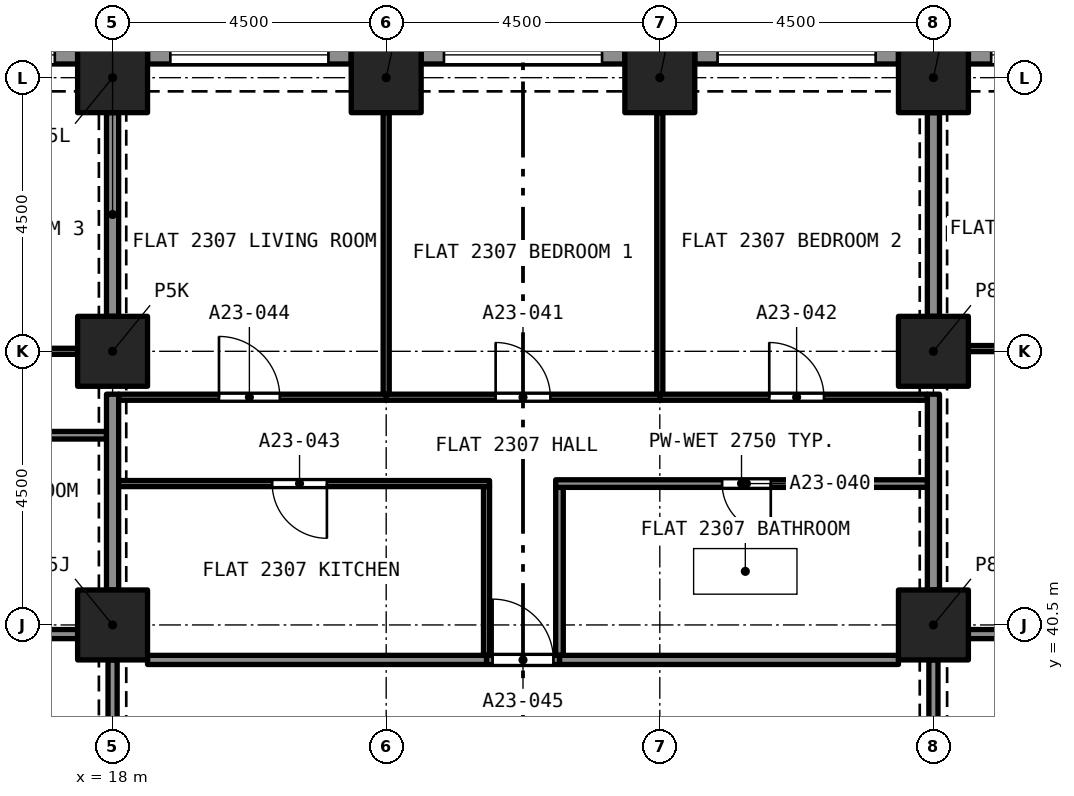
"""IFC4 building model, lengths in metres.
Left out: names, types, materials, properties, quantities, classifications, styles, units other than length and angle.
Written with IfcOpenShell. Run it as: python <this file> out.ifc"""

import sys

from ifc_helpers import new_model, si_unit, direction, frame, frame_2d, origin, origin_2d, place, context, subcontext, project, spatial, rectangle, extrude, element, fill, save


model = new_model("IFC4")
c1 = context("Model", 3, precision=1e-05, world=origin(), true_north=direction((0.0, 1.0)))
c2 = subcontext(c1, "Body", "Model", "MODEL_VIEW")
j1 = project(units=[si_unit("LENGTHUNIT", "METRE"), si_unit("PLANEANGLEUNIT", "RADIAN")], contexts=[c1])
p1 = place(None, origin())
s1 = spatial("IfcSite", under=j1, at=p1, CompositionType="ELEMENT")
p2 = place(p1, origin())
s2 = spatial("IfcBuilding", under=s1, at=p2, CompositionType="ELEMENT")
p3 = place(p2, frame((0.0, 0.0, 86.4)))
s3 = spatial("IfcBuildingStorey", under=s2, at=p3, CompositionType="ELEMENT", Elevation=86.4)
for number, where, z_axis, x_axis in (
    (1, (18.0, 40.5, 0.0), (0.0, 0.0, 1.0), (1.0, 0.0, 0.0)),
    (2, (31.5, 40.5, 0.0), (0.0, 0.0, 1.0), (1.0, 0.0, 0.0)),
    (3, (18.0, 45.0, 0.0), (0.0, 0.0, 1.0), (1.0, 0.0, 0.0)),
    (4, (31.5, 45.0, 0.0), (0.0, 0.0, 1.0), (1.0, 0.0, 0.0)),
    (5, (18.0, 49.5, 0.0), (0.0, 0.0, 1.0), (1.0, 0.0, 0.0)),
    (6, (22.5, 49.5, 0.0), (0.0, 0.0, 1.0), (1.0, 0.0, 0.0)),
    (7, (27.0, 49.5, 0.0), (0.0, 0.0, 1.0), (1.0, 0.0, 0.0)),
    (8, (31.5, 49.5, 0.0), (0.0, 0.0, 1.0), (1.0, 0.0, 0.0)),
):
    element("IfcColumn", number, at=place(p3, frame(where, z_axis=z_axis, x_axis=x_axis)), inside=s3, PredefinedType="COLUMN", context=c2, shape_type="SweptSolid", body=[
        extrude(rectangle(XDim=1.15, YDim=1.15, at=origin_2d()), origin(), (0.0, 0.0, 1.0), 3.2),
    ])
p4 = place(p3, frame((32.075, 49.875, 0.0), z_axis=(0.0, 0.0, 1.0), x_axis=(1.0, 0.0, 0.0)))
e9 = element("IfcWall", 9, at=p4, inside=s3, PredefinedType="SOLIDWALL", context=c2, shape_type="SweptSolid", body=[
    extrude(rectangle(XDim=3.35, YDim=0.3, at=frame_2d((1.675, 0.0))), origin(), (0.0, 0.0, 1.0), 3.2),
])
p5 = place(p4, frame((0.375, 0.0, 0.45)))
e10 = element("IfcOpeningElement", 10, at=p5, cuts=e9, PredefinedType="OPENING", context=c2, shape_type="SweptSolid", body=[
    extrude(rectangle(XDim=2.6, YDim=1.95, at=frame_2d((1.3, 0.975))), frame((0.0, 0.16, 0.0), z_axis=(0.0, -1.0, 0.0), x_axis=(1.0, 0.0, 0.0)), (0.0, 0.0, 1.0), 0.32),
])
p6 = place(p3, frame((27.575, 49.875, 0.0), z_axis=(0.0, 0.0, 1.0), x_axis=(1.0, 0.0, 0.0)))
e11 = element("IfcWall", 11, at=p6, inside=s3, PredefinedType="SOLIDWALL", context=c2, shape_type="SweptSolid", body=[
    extrude(rectangle(XDim=3.35, YDim=0.3, at=frame_2d((1.675, 0.0))), origin(), (0.0, 0.0, 1.0), 3.2),
])
p7 = place(p6, frame((0.375, 0.0, 0.45)))
e12 = element("IfcOpeningElement", 12, at=p7, cuts=e11, PredefinedType="OPENING", context=c2, shape_type="SweptSolid", body=[
    extrude(rectangle(XDim=2.6, YDim=1.95, at=frame_2d((1.3, 0.975))), frame((0.0, 0.16, 0.0), z_axis=(0.0, -1.0, 0.0), x_axis=(1.0, 0.0, 0.0)), (0.0, 0.0, 1.0), 0.32),
])
p8 = place(p3, frame((23.075, 49.875, 0.0), z_axis=(0.0, 0.0, 1.0), x_axis=(1.0, 0.0, 0.0)))
e13 = element("IfcWall", 13, at=p8, inside=s3, PredefinedType="SOLIDWALL", context=c2, shape_type="SweptSolid", body=[
    extrude(rectangle(XDim=3.35, YDim=0.3, at=frame_2d((1.675, 0.0))), origin(), (0.0, 0.0, 1.0), 3.2),
])
p9 = place(p8, frame((0.375, 0.0, 0.45)))
e14 = element("IfcOpeningElement", 14, at=p9, cuts=e13, PredefinedType="OPENING", context=c2, shape_type="SweptSolid", body=[
    extrude(rectangle(XDim=2.6, YDim=1.95, at=frame_2d((1.3, 0.975))), frame((0.0, 0.16, 0.0), z_axis=(0.0, -1.0, 0.0), x_axis=(1.0, 0.0, 0.0)), (0.0, 0.0, 1.0), 0.32),
])
p10 = place(p3, frame((18.575, 49.875, 0.0), z_axis=(0.0, 0.0, 1.0), x_axis=(1.0, 0.0, 0.0)))
e15 = element("IfcWall", 15, at=p10, inside=s3, PredefinedType="SOLIDWALL", context=c2, shape_type="SweptSolid", body=[
    extrude(rectangle(XDim=3.35, YDim=0.3, at=frame_2d((1.675, 0.0))), origin(), (0.0, 0.0, 1.0), 3.2),
])
p11 = place(p10, frame((0.375, 0.0, 0.45)))
e16 = element("IfcOpeningElement", 16, at=p11, cuts=e15, PredefinedType="OPENING", context=c2, shape_type="SweptSolid", body=[
    extrude(rectangle(XDim=2.6, YDim=1.95, at=frame_2d((1.3, 0.975))), frame((0.0, 0.16, 0.0), z_axis=(0.0, -1.0, 0.0), x_axis=(1.0, 0.0, 0.0)), (0.0, 0.0, 1.0), 0.32),
])
p12 = place(p3, frame((14.075, 49.875, 0.0), z_axis=(0.0, 0.0, 1.0), x_axis=(1.0, 0.0, 0.0)))
e17 = element("IfcWall", 17, at=p12, inside=s3, PredefinedType="SOLIDWALL", context=c2, shape_type="SweptSolid", body=[
    extrude(rectangle(XDim=3.35, YDim=0.3, at=frame_2d((1.675, 0.0))), origin(), (0.0, 0.0, 1.0), 3.2),
])
p13 = place(p12, frame((0.375, 0.0, 0.45)))
e18 = element("IfcOpeningElement", 18, at=p13, cuts=e17, PredefinedType="OPENING", context=c2, shape_type="SweptSolid", body=[
    extrude(rectangle(XDim=2.6, YDim=1.95, at=frame_2d((1.3, 0.975))), frame((0.0, 0.16, 0.0), z_axis=(0.0, -1.0, 0.0), x_axis=(1.0, 0.0, 0.0)), (0.0, 0.0, 1.0), 0.32),
])
p14 = place(p3, frame((17.9, 43.62, 0.0), z_axis=(0.0, 0.0, 1.0), x_axis=(-1.0, 0.0, 0.0)))
e19 = element("IfcWall", 19, at=p14, inside=s3, PredefinedType="PARTITIONING", context=c2, shape_type="SweptSolid", body=[
    extrude(rectangle(XDim=4.437, YDim=0.125, at=frame_2d((2.219, 0.0))), origin(), (0.0, 0.0, 1.0), 2.9),
])
p15 = place(p14, frame((1.769, 0.0, 0.0)))
e20 = element("IfcOpeningElement", 20, at=p15, cuts=e19, PredefinedType="OPENING", context=c2, shape_type="SweptSolid", body=[
    extrude(rectangle(XDim=0.8, YDim=2.1, at=frame_2d((0.4, 1.05))), frame((0.0, 0.073, 0.0), z_axis=(0.0, -1.0, 0.0), x_axis=(1.0, 0.0, 0.0)), (0.0, 0.0, 1.0), 0.145),
])
p16 = place(p3, frame((18.0, 41.075, 0.0), z_axis=(0.0, 0.0, 1.0), x_axis=(0.0, 1.0, 0.0)))
e21 = element("IfcWall", 21, at=p16, inside=s3, PredefinedType="PARTITIONING", context=c2, shape_type="SweptSolid", body=[
    extrude(rectangle(XDim=3.22, YDim=0.2, at=frame_2d((1.61, 0.0))), origin(), (0.0, 0.0, 1.0), 2.38),
])
p17 = place(p3, frame((13.4, 40.35, 0.0), z_axis=(0.0, 0.0, 1.0), x_axis=(1.0, 0.0, 0.0)))
e22 = element("IfcWall", 22, at=p17, inside=s3, PredefinedType="PARTITIONING", context=c2, shape_type="SweptSolid", body=[
    extrude(rectangle(XDim=4.025, YDim=0.15, at=frame_2d((2.012, 0.0))), origin(), (0.0, 0.0, 1.0), 2.9),
])
p18 = place(p3, frame((13.5, 45.0, 0.0), z_axis=(0.0, 0.0, 1.0), x_axis=(1.0, 0.0, 0.0)))
e23 = element("IfcWall", 23, at=p18, inside=s3, PredefinedType="PARTITIONING", context=c2, shape_type="SweptSolid", body=[
    extrude(rectangle(XDim=3.925, YDim=0.1, at=frame_2d((1.962, 0.0))), origin(), (0.0, 0.0, 1.0), 2.9),
])
p19 = place(p18, frame((1.8, 0.0, 0.0)))
e24 = element("IfcOpeningElement", 24, at=p19, cuts=e23, PredefinedType="OPENING", context=c2, shape_type="SweptSolid", body=[
    extrude(rectangle(XDim=0.9, YDim=2.1, at=frame_2d((0.45, 1.05))), frame((0.0, 0.06, 0.0), z_axis=(0.0, -1.0, 0.0), x_axis=(1.0, 0.0, 0.0)), (0.0, 0.0, 1.0), 0.12),
])
p20 = place(p3, frame((18.0, 45.575, 0.0), z_axis=(0.0, 0.0, 1.0), x_axis=(0.0, 1.0, 0.0)))
e25 = element("IfcWall", 25, at=p20, inside=s3, PredefinedType="PARTITIONING", context=c2, shape_type="SweptSolid", body=[
    extrude(rectangle(XDim=3.35, YDim=0.2, at=frame_2d((1.675, 0.0))), origin(), (0.0, 0.0, 1.0), 2.38),
])
p21 = place(p3, frame((32.075, 45.045, 0.0), z_axis=(0.0, 0.0, 1.0), x_axis=(1.0, 0.0, 0.0)))
e26 = element("IfcWall", 26, at=p21, inside=s3, PredefinedType="PARTITIONING", context=c2, shape_type="SweptSolid", body=[
    extrude(rectangle(XDim=3.925, YDim=0.1, at=frame_2d((1.962, 0.0))), origin(), (0.0, 0.0, 1.0), 2.9),
])
p22 = place(p21, frame((1.175, 0.0, 0.0)))
e27 = element("IfcOpeningElement", 27, at=p22, cuts=e26, PredefinedType="OPENING", context=c2, shape_type="SweptSolid", body=[
    extrude(rectangle(XDim=1.0, YDim=2.1, at=frame_2d((0.5, 1.05))), frame((0.0, 0.06, 0.0), z_axis=(0.0, -1.0, 0.0), x_axis=(1.0, 0.0, 0.0)), (0.0, 0.0, 1.0), 0.12),
])
p23 = place(p3, frame((31.5, 41.075, 0.0), z_axis=(0.0, 0.0, 1.0), x_axis=(0.0, 1.0, 0.0)))
e28 = element("IfcWall", 28, at=p23, inside=s3, PredefinedType="PARTITIONING", context=c2, shape_type="SweptSolid", body=[
    extrude(rectangle(XDim=3.22, YDim=0.2, at=frame_2d((1.61, 0.0))), origin(), (0.0, 0.0, 1.0), 2.38),
])
p24 = place(p3, frame((32.075, 40.35, 0.0), z_axis=(0.0, 0.0, 1.0), x_axis=(1.0, 0.0, 0.0)))
e29 = element("IfcWall", 29, at=p24, inside=s3, PredefinedType="PARTITIONING", context=c2, shape_type="SweptSolid", body=[
    extrude(rectangle(XDim=2.275, YDim=0.15, at=frame_2d((1.138, 0.0))), origin(), (0.0, 0.0, 1.0), 2.9),
])
p25 = place(p24, frame((1.145, 0.0, 0.0)))
e30 = element("IfcOpeningElement", 30, at=p25, cuts=e29, PredefinedType="OPENING", context=c2, shape_type="SweptSolid", body=[
    extrude(rectangle(XDim=1.0, YDim=2.1, at=frame_2d((0.5, 1.05))), frame((0.0, 0.085, 0.0), z_axis=(0.0, -1.0, 0.0), x_axis=(1.0, 0.0, 0.0)), (0.0, 0.0, 1.0), 0.17),
])
p26 = place(p3, frame((31.5, 45.575, 0.0), z_axis=(0.0, 0.0, 1.0), x_axis=(0.0, 1.0, 0.0)))
e31 = element("IfcWall", 31, at=p26, inside=s3, PredefinedType="PARTITIONING", context=c2, shape_type="SweptSolid", body=[
    extrude(rectangle(XDim=3.35, YDim=0.2, at=frame_2d((1.675, 0.0))), origin(), (0.0, 0.0, 1.0), 2.38),
])
p27 = place(p3, frame((25.35, 40.0, 0.0), z_axis=(0.0, 0.0, 1.0), x_axis=(0.0, 1.0, 0.0)))
e32 = element("IfcWall", 32, at=p27, inside=s3, PredefinedType="PARTITIONING", context=c2, shape_type="SweptSolid", body=[
    extrude(rectangle(XDim=2.762, YDim=0.125, at=frame_2d((1.381, 0.0))), origin(), (0.0, 0.0, 1.0), 2.75),
])
p28 = place(p3, frame((31.4, 42.825, 0.0), z_axis=(0.0, 0.0, 1.0), x_axis=(-1.0, 0.0, 0.0)))
e33 = element("IfcWall", 33, at=p28, inside=s3, PredefinedType="PARTITIONING", context=c2, shape_type="SweptSolid", body=[
    extrude(rectangle(XDim=6.112, YDim=0.125, at=frame_2d((3.056, 0.0))), origin(), (0.0, 0.0, 1.0), 2.75),
])
p29 = place(p28, frame((2.575, 0.0, 0.0)))
e34 = element("IfcOpeningElement", 34, at=p29, cuts=e33, PredefinedType="OPENING", context=c2, shape_type="SweptSolid", body=[
    extrude(rectangle(XDim=0.8, YDim=2.1, at=frame_2d((0.4, 1.05))), frame((0.0, 0.073, 0.0), z_axis=(0.0, -1.0, 0.0), x_axis=(1.0, 0.0, 0.0)), (0.0, 0.0, 1.0), 0.145),
])
p30 = place(p3, frame((25.35, 39.925, 0.0), z_axis=(0.0, 0.0, 1.0), x_axis=(1.0, 0.0, 0.0)))
e35 = element("IfcWall", 35, at=p30, inside=s3, PredefinedType="PARTITIONING", context=c2, shape_type="SweptSolid", body=[
    extrude(rectangle(XDim=5.575, YDim=0.15, at=frame_2d((2.788, 0.0))), origin(), (0.0, 0.0, 1.0), 2.75),
])
p31 = place(p3, frame((27.0, 44.295, 0.0), z_axis=(0.0, 0.0, 1.0), x_axis=(0.0, 1.0, 0.0)))
e36 = element("IfcWall", 36, at=p31, inside=s3, PredefinedType="PARTITIONING", context=c2, shape_type="SweptSolid", body=[
    extrude(rectangle(XDim=4.63, YDim=0.1, at=frame_2d((2.315, 0.0))), origin(), (0.0, 0.0, 1.0), 2.75),
])
p32 = place(p3, frame((22.5, 44.245, 0.0), z_axis=(0.0, 0.0, 1.0), x_axis=(1.0, 0.0, 0.0)))
e37 = element("IfcWall", 37, at=p32, inside=s3, PredefinedType="PARTITIONING", context=c2, shape_type="SweptSolid", body=[
    extrude(rectangle(XDim=4.5, YDim=0.1, at=frame_2d((2.25, 0.0))), origin(), (0.0, 0.0, 1.0), 2.75),
])
p33 = place(p32, frame((1.8, 0.0, 0.0)))
e38 = element("IfcOpeningElement", 38, at=p33, cuts=e37, PredefinedType="OPENING", context=c2, shape_type="SweptSolid", body=[
    extrude(rectangle(XDim=0.9, YDim=2.1, at=frame_2d((0.45, 1.05))), frame((0.0, 0.06, 0.0), z_axis=(0.0, -1.0, 0.0), x_axis=(1.0, 0.0, 0.0)), (0.0, 0.0, 1.0), 0.12),
])
p34 = place(p3, frame((22.5, 44.295, 0.0), z_axis=(0.0, 0.0, 1.0), x_axis=(0.0, 1.0, 0.0)))
e39 = element("IfcWall", 39, at=p34, inside=s3, PredefinedType="PARTITIONING", context=c2, shape_type="SweptSolid", body=[
    extrude(rectangle(XDim=4.63, YDim=0.1, at=frame_2d((2.315, 0.0))), origin(), (0.0, 0.0, 1.0), 2.75),
])
p35 = place(p3, frame((27.0, 44.245, 0.0), z_axis=(0.0, 0.0, 1.0), x_axis=(1.0, 0.0, 0.0)))
e40 = element("IfcWall", 40, at=p35, inside=s3, PredefinedType="PARTITIONING", context=c2, shape_type="SweptSolid", body=[
    extrude(rectangle(XDim=4.4, YDim=0.1, at=frame_2d((2.2, 0.0))), origin(), (0.0, 0.0, 1.0), 2.75),
])
p36 = place(p35, frame((1.8, 0.0, 0.0)))
e41 = element("IfcOpeningElement", 41, at=p36, cuts=e40, PredefinedType="OPENING", context=c2, shape_type="SweptSolid", body=[
    extrude(rectangle(XDim=0.9, YDim=2.1, at=frame_2d((0.45, 1.05))), frame((0.0, 0.06, 0.0), z_axis=(0.0, -1.0, 0.0), x_axis=(1.0, 0.0, 0.0)), (0.0, 0.0, 1.0), 0.12),
])
p37 = place(p3, frame((24.15, 40.0, 0.0), z_axis=(0.0, 0.0, 1.0), x_axis=(0.0, 1.0, 0.0)))
e42 = element("IfcWall", 42, at=p37, inside=s3, PredefinedType="PARTITIONING", context=c2, shape_type="SweptSolid", body=[
    extrude(rectangle(XDim=2.775, YDim=0.1, at=frame_2d((1.387, 0.0))), origin(), (0.0, 0.0, 1.0), 2.75),
])
p38 = place(p3, frame((24.2, 42.825, 0.0), z_axis=(0.0, 0.0, 1.0), x_axis=(-1.0, 0.0, 0.0)))
e43 = element("IfcWall", 43, at=p38, inside=s3, PredefinedType="PARTITIONING", context=c2, shape_type="SweptSolid", body=[
    extrude(rectangle(XDim=6.1, YDim=0.1, at=frame_2d((3.05, 0.0))), origin(), (0.0, 0.0, 1.0), 2.75),
])
p39 = place(p38, frame((2.675, 0.0, 0.0)))
e44 = element("IfcOpeningElement", 44, at=p39, cuts=e43, PredefinedType="OPENING", context=c2, shape_type="SweptSolid", body=[
    extrude(rectangle(XDim=0.9, YDim=2.1, at=frame_2d((0.45, 1.05))), frame((0.0, 0.06, 0.0), z_axis=(0.0, -1.0, 0.0), x_axis=(1.0, 0.0, 0.0)), (0.0, 0.0, 1.0), 0.12),
])
p40 = place(p3, frame((18.1, 44.245, 0.0), z_axis=(0.0, 0.0, 1.0), x_axis=(1.0, 0.0, 0.0)))
e45 = element("IfcWall", 45, at=p40, inside=s3, PredefinedType="PARTITIONING", context=c2, shape_type="SweptSolid", body=[
    extrude(rectangle(XDim=4.4, YDim=0.1, at=frame_2d((2.2, 0.0))), origin(), (0.0, 0.0, 1.0), 2.75),
])
p41 = place(p40, frame((1.65, 0.0, 0.0)))
e46 = element("IfcOpeningElement", 46, at=p41, cuts=e45, PredefinedType="OPENING", context=c2, shape_type="SweptSolid", body=[
    extrude(rectangle(XDim=1.0, YDim=2.1, at=frame_2d((0.5, 1.05))), frame((0.0, 0.06, 0.0), z_axis=(0.0, -1.0, 0.0), x_axis=(1.0, 0.0, 0.0)), (0.0, 0.0, 1.0), 0.12),
])
p42 = place(p3, frame((24.15, 39.925, 0.0), z_axis=(0.0, 0.0, 1.0), x_axis=(1.0, 0.0, 0.0)))
e47 = element("IfcWall", 47, at=p42, inside=s3, PredefinedType="PARTITIONING", context=c2, shape_type="SweptSolid", body=[
    extrude(rectangle(XDim=1.2, YDim=0.15, at=frame_2d((0.6, 0.0))), origin(), (0.0, 0.0, 1.0), 2.75),
])
p43 = place(p42, frame((0.1, 0.0, 0.0)))
e48 = element("IfcOpeningElement", 48, at=p43, cuts=e47, PredefinedType="OPENING", context=c2, shape_type="SweptSolid", body=[
    extrude(rectangle(XDim=1.0, YDim=2.1, at=frame_2d((0.5, 1.05))), frame((0.0, 0.085, 0.0), z_axis=(0.0, -1.0, 0.0), x_axis=(1.0, 0.0, 0.0)), (0.0, 0.0, 1.0), 0.17),
])
p44 = place(p3, frame((18.575, 39.925, 0.0), z_axis=(0.0, 0.0, 1.0), x_axis=(1.0, 0.0, 0.0)))
e49 = element("IfcWall", 49, at=p44, inside=s3, PredefinedType="PARTITIONING", context=c2, shape_type="SweptSolid", body=[
    extrude(rectangle(XDim=5.575, YDim=0.15, at=frame_2d((2.788, 0.0))), origin(), (0.0, 0.0, 1.0), 2.75),
])
p45 = place(p3, frame((31.5, 36.575, 0.0), z_axis=(0.0, 0.0, 1.0), x_axis=(0.0, 1.0, 0.0)))
e50 = element("IfcWall", 50, at=p45, inside=s3, PredefinedType="PARTITIONING", context=c2, shape_type="SweptSolid", body=[
    extrude(rectangle(XDim=3.35, YDim=0.15, at=frame_2d((1.675, 0.0))), origin(), (0.0, 0.0, 1.0), 2.38),
])
p46 = place(p45, frame((1.075, 0.0, 0.0)))
e51 = element("IfcOpeningElement", 51, at=p46, cuts=e50, PredefinedType="OPENING", context=c2, shape_type="SweptSolid", body=[
    extrude(rectangle(XDim=1.2, YDim=2.1, at=frame_2d((0.6, 1.05))), frame((0.0, 0.085, 0.0), z_axis=(0.0, -1.0, 0.0), x_axis=(1.0, 0.0, 0.0)), (0.0, 0.0, 1.0), 0.17),
])
p47 = place(p3, frame((18.0, 39.925, 0.0), z_axis=(0.0, 0.0, 1.0), x_axis=(0.0, -1.0, 0.0)))
e52 = element("IfcWall", 52, at=p47, inside=s3, PredefinedType="PARTITIONING", context=c2, shape_type="SweptSolid", body=[
    extrude(rectangle(XDim=3.35, YDim=0.15, at=frame_2d((1.675, 0.0))), origin(), (0.0, 0.0, 1.0), 2.38),
])
p48 = place(p47, frame((1.075, 0.0, 0.0)))
e53 = element("IfcOpeningElement", 53, at=p48, cuts=e52, PredefinedType="OPENING", context=c2, shape_type="SweptSolid", body=[
    extrude(rectangle(XDim=1.2, YDim=2.1, at=frame_2d((0.6, 1.05))), frame((0.0, 0.085, 0.0), z_axis=(0.0, -1.0, 0.0), x_axis=(1.0, 0.0, 0.0)), (0.0, 0.0, 1.0), 0.17),
])
p49 = place(p5, origin())
e54 = element("IfcWindow", 54, at=p49, inside=s3, PartitioningType="SINGLE_PANEL", PredefinedType="WINDOW", context=c2, shape_type="SweptSolid", body=[
    extrude(rectangle(XDim=2.6, YDim=1.95, at=frame_2d((1.3, 0.975))), frame((0.0, 0.03, 0.0), z_axis=(0.0, -1.0, 0.0), x_axis=(1.0, 0.0, 0.0)), (0.0, 0.0, 1.0), 0.06),
])
fill(e10, e54)
p50 = place(p7, origin())
e55 = element("IfcWindow", 55, at=p50, inside=s3, PartitioningType="SINGLE_PANEL", PredefinedType="WINDOW", context=c2, shape_type="SweptSolid", body=[
    extrude(rectangle(XDim=2.6, YDim=1.95, at=frame_2d((1.3, 0.975))), frame((0.0, 0.03, 0.0), z_axis=(0.0, -1.0, 0.0), x_axis=(1.0, 0.0, 0.0)), (0.0, 0.0, 1.0), 0.06),
])
fill(e12, e55)
p51 = place(p9, origin())
e56 = element("IfcWindow", 56, at=p51, inside=s3, PartitioningType="SINGLE_PANEL", PredefinedType="WINDOW", context=c2, shape_type="SweptSolid", body=[
    extrude(rectangle(XDim=2.6, YDim=1.95, at=frame_2d((1.3, 0.975))), frame((0.0, 0.03, 0.0), z_axis=(0.0, -1.0, 0.0), x_axis=(1.0, 0.0, 0.0)), (0.0, 0.0, 1.0), 0.06),
])
fill(e14, e56)
p52 = place(p11, origin())
e57 = element("IfcWindow", 57, at=p52, inside=s3, PartitioningType="SINGLE_PANEL", PredefinedType="WINDOW", context=c2, shape_type="SweptSolid", body=[
    extrude(rectangle(XDim=2.6, YDim=1.95, at=frame_2d((1.3, 0.975))), frame((0.0, 0.03, 0.0), z_axis=(0.0, -1.0, 0.0), x_axis=(1.0, 0.0, 0.0)), (0.0, 0.0, 1.0), 0.06),
])
fill(e16, e57)
p53 = place(p13, origin())
e58 = element("IfcWindow", 58, at=p53, inside=s3, PartitioningType="SINGLE_PANEL", PredefinedType="WINDOW", context=c2, shape_type="SweptSolid", body=[
    extrude(rectangle(XDim=2.6, YDim=1.95, at=frame_2d((1.3, 0.975))), frame((0.0, 0.03, 0.0), z_axis=(0.0, -1.0, 0.0), x_axis=(1.0, 0.0, 0.0)), (0.0, 0.0, 1.0), 0.06),
])
fill(e18, e58)
p54 = place(p29, origin())
e59 = element("IfcDoor", 59, at=p54, inside=s3, OperationType="SINGLE_SWING_LEFT", PredefinedType="DOOR", context=c2, shape_type="SweptSolid", body=[
    extrude(rectangle(XDim=0.8, YDim=2.1, at=frame_2d((0.4, 1.05))), frame((0.0, 0.025, 0.0), z_axis=(0.0, -1.0, 0.0), x_axis=(1.0, 0.0, 0.0)), (0.0, 0.0, 1.0), 0.05),
])
fill(e34, e59)
p55 = place(p33, origin())
e60 = element("IfcDoor", 60, at=p55, inside=s3, OperationType="SINGLE_SWING_LEFT", PredefinedType="DOOR", context=c2, shape_type="SweptSolid", body=[
    extrude(rectangle(XDim=0.9, YDim=2.1, at=frame_2d((0.45, 1.05))), frame((0.0, 0.025, 0.0), z_axis=(0.0, -1.0, 0.0), x_axis=(1.0, 0.0, 0.0)), (0.0, 0.0, 1.0), 0.05),
])
fill(e38, e60)
p56 = place(p36, origin())
e61 = element("IfcDoor", 61, at=p56, inside=s3, OperationType="SINGLE_SWING_RIGHT", PredefinedType="DOOR", context=c2, shape_type="SweptSolid", body=[
    extrude(rectangle(XDim=0.9, YDim=2.1, at=frame_2d((0.45, 1.05))), frame((0.0, 0.025, 0.0), z_axis=(0.0, -1.0, 0.0), x_axis=(1.0, 0.0, 0.0)), (0.0, 0.0, 1.0), 0.05),
])
fill(e41, e61)
p57 = place(p39, origin())
e62 = element("IfcDoor", 62, at=p57, inside=s3, OperationType="SINGLE_SWING_RIGHT", PredefinedType="DOOR", context=c2, shape_type="SweptSolid", body=[
    extrude(rectangle(XDim=0.9, YDim=2.1, at=frame_2d((0.45, 1.05))), frame((0.0, 0.025, 0.0), z_axis=(0.0, -1.0, 0.0), x_axis=(1.0, 0.0, 0.0)), (0.0, 0.0, 1.0), 0.05),
])
fill(e44, e62)
p58 = place(p41, origin())
e63 = element("IfcDoor", 63, at=p58, inside=s3, OperationType="SINGLE_SWING_LEFT", PredefinedType="DOOR", context=c2, shape_type="SweptSolid", body=[
    extrude(rectangle(XDim=1.0, YDim=2.1, at=frame_2d((0.5, 1.05))), frame((0.0, 0.025, 0.0), z_axis=(0.0, -1.0, 0.0), x_axis=(1.0, 0.0, 0.0)), (0.0, 0.0, 1.0), 0.05),
])
fill(e46, e63)
p59 = place(p43, origin())
e64 = element("IfcDoor", 64, at=p59, inside=s3, OperationType="SINGLE_SWING_RIGHT", PredefinedType="DOOR", context=c2, shape_type="SweptSolid", body=[
    extrude(rectangle(XDim=1.0, YDim=2.1, at=frame_2d((0.5, 1.05))), frame((0.0, 0.025, 0.0), z_axis=(0.0, -1.0, 0.0), x_axis=(1.0, 0.0, 0.0)), (0.0, 0.0, 1.0), 0.05),
])
fill(e48, e64)
save(model, sys.argv[1])
